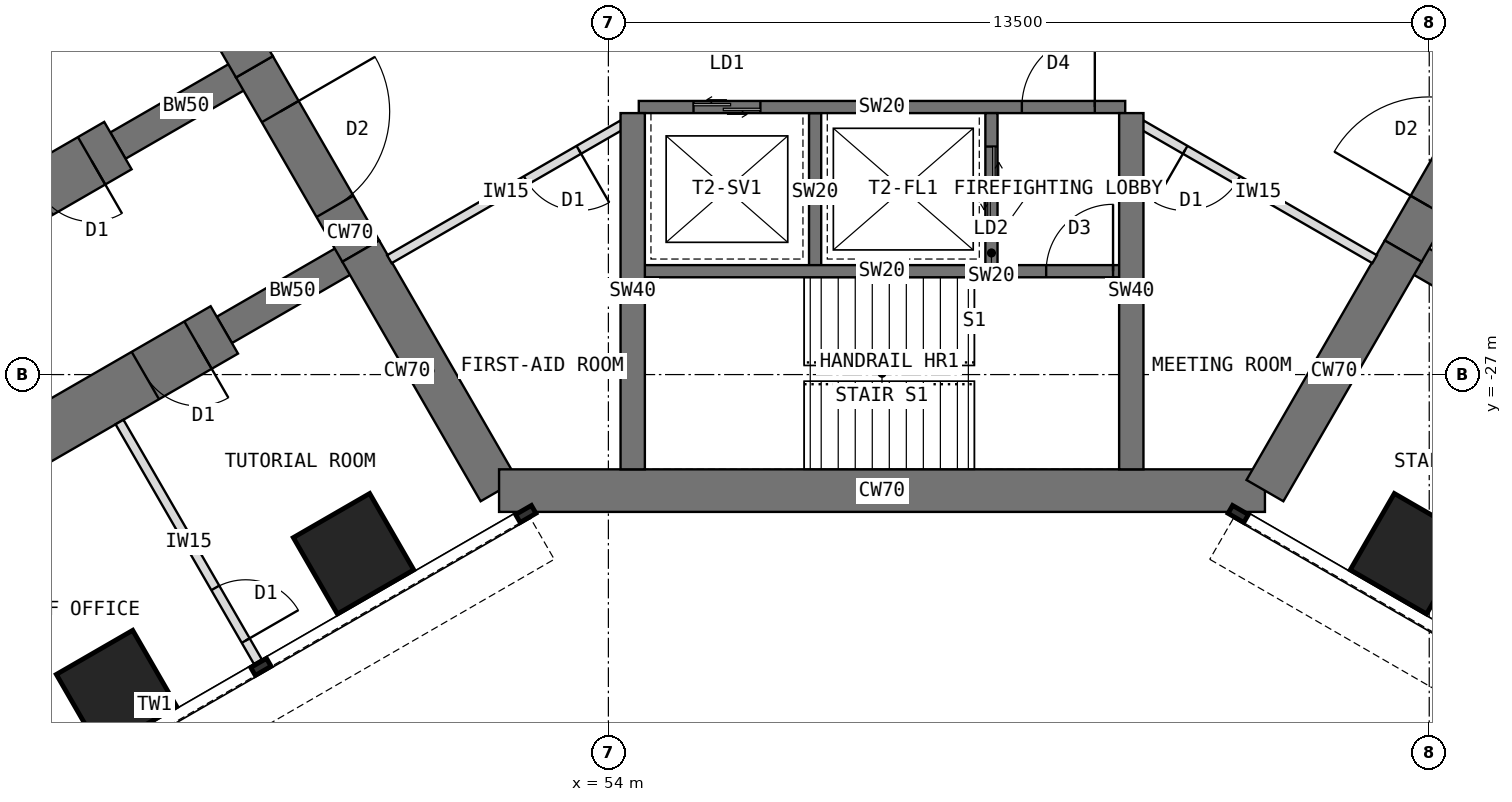
"""IFC4 building model, lengths in metres.
Left out: names, types, materials, properties, quantities, classifications, styles, units other than length and angle.
Written with IfcOpenShell. Run it as: python <this file> out.ifc"""

import sys

from ifc_helpers import new_model, si_unit, direction, frame, frame_2d, origin, origin_2d, place, context, subcontext, project, spatial, rectangle, extrude, element, fill, save


model = new_model("IFC4")
c1 = context("Model", 3, precision=1e-05, world=origin(), true_north=direction((0.0, 1.0)))
c2 = subcontext(c1, "Body", "Model", "MODEL_VIEW")
j1 = project(units=[si_unit("LENGTHUNIT", "METRE"), si_unit("PLANEANGLEUNIT", "RADIAN")], contexts=[c1])
p1 = place(None, origin())
s1 = spatial("IfcSite", under=j1, at=p1, CompositionType="ELEMENT")
p2 = place(p1, origin())
s2 = spatial("IfcBuilding", under=s1, at=p2, CompositionType="ELEMENT")
p3 = place(p2, frame((0.0, 0.0, 64.5)))
s3 = spatial("IfcBuildingStorey", under=s2, at=p3, CompositionType="ELEMENT", Elevation=64.5)
p4 = place(p3, frame((45.904, -18.0, 0.0), z_axis=(0.0, 0.0, 1.0), x_axis=(0.500024481964, -0.866011268655, 0.0)))
e1 = element("IfcWall", 1, at=p4, inside=s3, PredefinedType="SHEAR", context=c2, shape_type="SweptSolid", body=[
    extrude(rectangle(XDim=4.548, YDim=0.7, at=frame_2d((2.274, 0.0))), origin(), (0.0, 0.0, 1.0), 4.0),
])
p5 = place(p3, frame((48.178, -21.939, 0.0), z_axis=(0.0, 0.0, 1.0), x_axis=(0.500010275428, -0.866019471182, 0.0)))
e2 = element("IfcWall", 2, at=p5, inside=s3, PredefinedType="SHEAR", context=c2, shape_type="SweptSolid", body=[
    extrude(rectangle(XDim=3.5, YDim=0.7, at=frame_2d((1.75, 0.0))), origin(), (0.0, 0.0, 1.0), 4.0),
])
p6 = place(p5, frame((0.85, 0.0, 0.0)))
e3 = element("IfcOpeningElement", 3, at=p6, cuts=e2, PredefinedType="OPENING", context=c2, shape_type="SweptSolid", body=[
    extrude(rectangle(XDim=1.8, YDim=2.1, at=frame_2d((0.9, 1.05))), frame((0.0, 0.36, 0.0), z_axis=(0.0, -1.0, 0.0), x_axis=(1.0, 0.0, 0.0)), (0.0, 0.0, 1.0), 0.72),
])
p7 = place(p3, frame((49.928, -24.97, 0.0), z_axis=(0.0, 0.0, 1.0), x_axis=(0.499984222037, -0.866034513004, 0.0)))
e4 = element("IfcWall", 4, at=p7, inside=s3, PredefinedType="SHEAR", context=c2, shape_type="SweptSolid", body=[
    extrude(rectangle(XDim=4.548, YDim=0.7, at=frame_2d((2.274, 0.0))), origin(), (0.0, 0.0, 1.0), 4.0),
])
p8 = place(p3, frame((52.202, -28.908, 0.0), z_axis=(0.0, 0.0, 1.0), x_axis=(1.0, 0.0, 0.0)))
e5 = element("IfcWall", 5, at=p8, inside=s3, PredefinedType="SHEAR", context=c2, shape_type="SweptSolid", body=[
    extrude(rectangle(XDim=12.596, YDim=0.7, at=frame_2d((6.298, 0.0))), origin(), (0.0, 0.0, 1.0), 4.0),
])
p9 = place(p3, frame((64.798, -28.908, 0.0), z_axis=(0.0, 0.0, 1.0), x_axis=(0.499984222037, 0.866034513004, 0.0)))
e6 = element("IfcWall", 6, at=p9, inside=s3, PredefinedType="SHEAR", context=c2, shape_type="SweptSolid", body=[
    extrude(rectangle(XDim=4.548, YDim=0.7, at=frame_2d((2.274, 0.0))), origin(), (0.0, 0.0, 1.0), 4.0),
])
p10 = place(p3, frame((67.072, -24.97, 0.0), z_axis=(0.0, 0.0, 1.0), x_axis=(0.500010275428, 0.866019471182, 0.0)))
e7 = element("IfcWall", 7, at=p10, inside=s3, PredefinedType="SHEAR", context=c2, shape_type="SweptSolid", body=[
    extrude(rectangle(XDim=3.5, YDim=0.7, at=frame_2d((1.75, 0.0))), origin(), (0.0, 0.0, 1.0), 4.0),
])
p11 = place(p10, frame((0.85, 0.0, 0.0)))
e8 = element("IfcOpeningElement", 8, at=p11, cuts=e7, PredefinedType="OPENING", context=c2, shape_type="SweptSolid", body=[
    extrude(rectangle(XDim=1.8, YDim=2.1, at=frame_2d((0.9, 1.05))), frame((0.0, 0.36, 0.0), z_axis=(0.0, -1.0, 0.0), x_axis=(1.0, 0.0, 0.0)), (0.0, 0.0, 1.0), 0.72),
])
p12 = place(p3, frame((49.928, -24.97, 0.0), z_axis=(0.0, 0.0, 1.0), x_axis=(-0.866031863473, -0.499988811324, 0.0)))
e9 = element("IfcWall", 9, at=p12, inside=s3, PredefinedType="SHEAR", context=c2, shape_type="SweptSolid", body=[
    extrude(rectangle(XDim=2.592, YDim=0.5, at=frame_2d((1.296, 0.0))), origin(), (0.0, 0.0, 1.0), 4.0),
])
p13 = place(p3, frame((47.684, -26.266, 0.0), z_axis=(0.0, 0.0, 1.0), x_axis=(-0.866027579429, -0.499996231654, 0.0)))
e10 = element("IfcWall", 10, at=p13, inside=s3, PredefinedType="SHEAR", context=c2, shape_type="SweptSolid", body=[
    extrude(rectangle(XDim=13.2, YDim=0.9, at=frame_2d((6.6, 0.0))), origin(), (0.0, 0.0, 1.0), 4.0),
])
p14 = place(p13, frame((0.5, 0.0, 0.0)))
e11 = element("IfcOpeningElement", 11, at=p14, cuts=e10, PredefinedType="OPENING", context=c2, shape_type="SweptSolid", body=[
    extrude(rectangle(XDim=1.0, YDim=2.1, at=frame_2d((0.5, 1.05))), frame((0.0, 0.46, 0.0), z_axis=(0.0, -1.0, 0.0), x_axis=(1.0, 0.0, 0.0)), (0.0, 0.0, 1.0), 0.92),
])
p15 = place(p13, frame((7.25, 0.0, 0.0)))
e12 = element("IfcOpeningElement", 12, at=p15, cuts=e10, PredefinedType="OPENING", context=c2, shape_type="SweptSolid", body=[
    extrude(rectangle(XDim=1.0, YDim=2.1, at=frame_2d((0.5, 1.05))), frame((0.0, 0.46, 0.0), z_axis=(0.0, -1.0, 0.0), x_axis=(1.0, 0.0, 0.0)), (0.0, 0.0, 1.0), 0.92),
])
p16 = place(p3, frame((48.178, -21.939, 0.0), z_axis=(0.0, 0.0, 1.0), x_axis=(-0.866072649678, -0.499918158782, 0.0)))
e13 = element("IfcWall", 13, at=p16, inside=s3, PredefinedType="SHEAR", context=c2, shape_type="SweptSolid", body=[
    extrude(rectangle(XDim=2.592, YDim=0.5, at=frame_2d((1.296, 0.0))), origin(), (0.0, 0.0, 1.0), 4.0),
])
p17 = place(p3, frame((45.934, -23.234, 0.0), z_axis=(0.0, 0.0, 1.0), x_axis=(-0.866019570528, -0.500010103361, 0.0)))
e14 = element("IfcWall", 14, at=p17, inside=s3, PredefinedType="SHEAR", context=c2, shape_type="SweptSolid", body=[
    extrude(rectangle(XDim=13.2, YDim=0.9, at=frame_2d((6.6, 0.0))), origin(), (0.0, 0.0, 1.0), 4.0),
])
p18 = place(p17, frame((0.5, 0.0, 0.0)))
e15 = element("IfcOpeningElement", 15, at=p18, cuts=e14, PredefinedType="OPENING", context=c2, shape_type="SweptSolid", body=[
    extrude(rectangle(XDim=1.0, YDim=2.1, at=frame_2d((0.5, 1.05))), frame((0.0, 0.46, 0.0), z_axis=(0.0, -1.0, 0.0), x_axis=(1.0, 0.0, 0.0)), (0.0, 0.0, 1.0), 0.92),
])
p19 = place(p17, frame((7.25, 0.0, 0.0)))
e16 = element("IfcOpeningElement", 16, at=p19, cuts=e14, PredefinedType="OPENING", context=c2, shape_type="SweptSolid", body=[
    extrude(rectangle(XDim=1.0, YDim=2.1, at=frame_2d((0.5, 1.05))), frame((0.0, 0.46, 0.0), z_axis=(0.0, -1.0, 0.0), x_axis=(1.0, 0.0, 0.0)), (0.0, 0.0, 1.0), 0.92),
])
p20 = place(p3, frame((67.072, -24.97, 0.0), z_axis=(0.0, 0.0, 1.0), x_axis=(0.866031863473, -0.499988811324, 0.0)))
e17 = element("IfcWall", 17, at=p20, inside=s3, PredefinedType="SHEAR", context=c2, shape_type="SweptSolid", body=[
    extrude(rectangle(XDim=2.592, YDim=0.5, at=frame_2d((1.296, 0.0))), origin(), (0.0, 0.0, 1.0), 4.0),
])
for number, where, z_axis, x_axis in (
    (18, (49.809, -29.946, 0.0), (0.0, 0.0, 1.0), (0.866, 0.5, 0.0)),
    (19, (45.912, -32.196, 0.0), (0.0, 0.0, 1.0), (0.866, 0.5, 0.0)),
    (20, (67.191, -29.946, 0.0), (0.0, 0.0, 1.0), (0.5, 0.866, 0.0)),
):
    element("IfcColumn", number, at=place(p3, frame(where, z_axis=z_axis, x_axis=x_axis)), inside=s3, PredefinedType="COLUMN", context=c2, shape_type="SweptSolid", body=[
        extrude(rectangle(XDim=1.45, YDim=1.45, at=origin_2d()), origin(), (0.0, 0.0, 1.0), 4.0),
    ])
p21 = place(p3, frame((54.5, -22.6, 0.0), z_axis=(0.0, 0.0, 1.0), x_axis=(1.0, 0.0, 0.0)))
e21 = element("IfcWall", 21, at=p21, inside=s3, PredefinedType="SHEAR", context=c2, shape_type="SweptSolid", body=[
    extrude(rectangle(XDim=8.0, YDim=0.2, at=frame_2d((4.0, 0.0))), origin(), (0.0, 0.0, 1.0), 4.0),
])
p22 = place(p21, frame((6.3, 0.0, 0.0)))
e22 = element("IfcOpeningElement", 22, at=p22, cuts=e21, PredefinedType="OPENING", context=c2, shape_type="SweptSolid", body=[
    extrude(rectangle(XDim=1.2, YDim=2.1, at=frame_2d((0.6, 1.05))), frame((0.0, 0.11, 0.0), z_axis=(0.0, -1.0, 0.0), x_axis=(1.0, 0.0, 0.0)), (0.0, 0.0, 1.0), 0.22),
])
p23 = place(p21, frame((0.9, 0.0, 0.0)))
e23 = element("IfcOpeningElement", 23, at=p23, cuts=e21, PredefinedType="OPENING", context=c2, shape_type="SweptSolid", body=[
    extrude(rectangle(XDim=1.1, YDim=2.2, at=frame_2d((0.55, 1.1))), frame((0.0, 0.11, 0.0), z_axis=(0.0, -1.0, 0.0), x_axis=(1.0, 0.0, 0.0)), (0.0, 0.0, 1.0), 0.22),
])
p24 = place(p3, frame((57.4, -22.7, 0.0), z_axis=(0.0, 0.0, 1.0), x_axis=(0.0, -1.0, 0.0)))
e24 = element("IfcWall", 24, at=p24, inside=s3, PredefinedType="SHEAR", context=c2, shape_type="SweptSolid", body=[
    extrude(rectangle(XDim=2.6, YDim=0.2, at=frame_2d((1.3, 0.0))), origin(), (0.0, 0.0, 1.0), 4.0),
])
p25 = place(p3, frame((60.3, -22.7, 0.0), z_axis=(0.0, 0.0, 1.0), x_axis=(0.0, -1.0, 0.0)))
e25 = element("IfcWall", 25, at=p25, inside=s3, PredefinedType="SHEAR", context=c2, shape_type="SweptSolid", body=[
    extrude(rectangle(XDim=2.6, YDim=0.2, at=frame_2d((1.3, 0.0))), origin(), (0.0, 0.0, 1.0), 4.0),
])
p26 = place(p25, frame((0.55, 0.0, 0.0)))
e26 = element("IfcOpeningElement", 26, at=p26, cuts=e25, PredefinedType="OPENING", context=c2, shape_type="SweptSolid", body=[
    extrude(rectangle(XDim=1.3, YDim=2.2, at=frame_2d((0.65, 1.1))), frame((0.0, 0.11, 0.0), z_axis=(0.0, -1.0, 0.0), x_axis=(1.0, 0.0, 0.0)), (0.0, 0.0, 1.0), 0.22),
])
p27 = place(p3, frame((54.5, -25.3, 0.0), z_axis=(0.0, 0.0, 1.0), x_axis=(1.0, 0.0, 0.0)))
e27 = element("IfcWall", 27, at=p27, inside=s3, PredefinedType="SHEAR", context=c2, shape_type="SweptSolid", body=[
    extrude(rectangle(XDim=8.0, YDim=0.2, at=frame_2d((4.0, 0.0))), origin(), (0.0, 0.0, 1.0), 4.0),
])
p28 = place(p27, frame((6.7, 0.0, 0.0)))
e28 = element("IfcOpeningElement", 28, at=p28, cuts=e27, PredefinedType="OPENING", context=c2, shape_type="SweptSolid", body=[
    extrude(rectangle(XDim=1.1, YDim=2.1, at=frame_2d((0.55, 1.05))), frame((0.0, 0.11, 0.0), z_axis=(0.0, -1.0, 0.0), x_axis=(1.0, 0.0, 0.0)), (0.0, 0.0, 1.0), 0.22),
])
for number, where, z_axis, x_axis in (
    (29, (62.6, -22.7, 0.0), (0.0, 0.0, 1.0), (0.0, -1.0, 0.0)),
    (30, (54.4, -22.7, 0.0), (0.0, 0.0, 1.0), (0.0, -1.0, 0.0)),
):
    element("IfcWall", number, at=place(p3, frame(where, z_axis=z_axis, x_axis=x_axis)), inside=s3, PredefinedType="SHEAR", context=c2, shape_type="SweptSolid", body=[
        extrude(rectangle(XDim=5.858, YDim=0.4, at=frame_2d((2.929, 0.0))), origin(), (0.0, 0.0, 1.0), 4.0),
    ])
p29 = place(p3, frame((45.96, -27.78, 0.0), z_axis=(0.0, 0.0, 1.0), x_axis=(0.499982560684, -0.866035472144, 0.0)))
e31 = element("IfcWall", 31, at=p29, inside=s3, PredefinedType="PARTITIONING", context=c2, shape_type="SweptSolid", body=[
    extrude(rectangle(XDim=4.55, YDim=0.15, at=frame_2d((2.275, 0.0))), origin(), (0.0, 0.0, 1.0), 3.8),
])
p30 = place(p29, frame((3.15, 0.0, 0.0)))
e32 = element("IfcOpeningElement", 32, at=p30, cuts=e31, PredefinedType="OPENING", context=c2, shape_type="SweptSolid", body=[
    extrude(rectangle(XDim=1.0, YDim=2.1, at=frame_2d((0.5, 1.05))), frame((0.0, 0.085, 0.0), z_axis=(0.0, -1.0, 0.0), x_axis=(1.0, 0.0, 0.0)), (0.0, 0.0, 1.0), 0.17),
])
p31 = place(p3, frame((66.603, -25.103, 0.0), z_axis=(0.0, 0.0, 1.0), x_axis=(-0.866021148949, 0.500007369519, 0.0)))
e33 = element("IfcWall", 33, at=p31, inside=s3, PredefinedType="PARTITIONING", context=c2, shape_type="SweptSolid", body=[
    extrude(rectangle(XDim=4.426, YDim=0.15, at=frame_2d((2.213, 0.0))), origin(), (0.0, 0.0, 1.0), 3.8),
])
p32 = place(p31, frame((2.598, 0.0, 0.0)))
e34 = element("IfcOpeningElement", 34, at=p32, cuts=e33, PredefinedType="OPENING", context=c2, shape_type="SweptSolid", body=[
    extrude(rectangle(XDim=1.0, YDim=2.1, at=frame_2d((0.5, 1.05))), frame((0.0, 0.085, 0.0), z_axis=(0.0, -1.0, 0.0), x_axis=(1.0, 0.0, 0.0)), (0.0, 0.0, 1.0), 0.17),
])
p33 = place(p3, frame((54.23, -22.89, 0.0), z_axis=(0.0, 0.0, 1.0), x_axis=(-0.866021148949, -0.500007369519, 0.0)))
e35 = element("IfcWall", 35, at=p33, inside=s3, PredefinedType="PARTITIONING", context=c2, shape_type="SweptSolid", body=[
    extrude(rectangle(XDim=4.426, YDim=0.15, at=frame_2d((2.213, 0.0))), origin(), (0.0, 0.0, 1.0), 3.8),
])
p34 = place(p33, frame((0.828, 0.0, 0.0)))
e36 = element("IfcOpeningElement", 36, at=p34, cuts=e35, PredefinedType="OPENING", context=c2, shape_type="SweptSolid", body=[
    extrude(rectangle(XDim=1.0, YDim=2.1, at=frame_2d((0.5, 1.05))), frame((0.0, 0.085, 0.0), z_axis=(0.0, -1.0, 0.0), x_axis=(1.0, 0.0, 0.0)), (0.0, 0.0, 1.0), 0.17),
])
p35 = place(p22, origin())
e37 = element("IfcDoor", 37, at=p35, inside=s3, OperationType="SINGLE_SWING_RIGHT", PredefinedType="DOOR", context=c2, shape_type="SweptSolid", body=[
    extrude(rectangle(XDim=1.2, YDim=2.1, at=frame_2d((0.6, 1.05))), frame((0.0, 0.025, 0.0), z_axis=(0.0, -1.0, 0.0), x_axis=(1.0, 0.0, 0.0)), (0.0, 0.0, 1.0), 0.05),
])
fill(e22, e37)
p36 = place(p26, origin())
e38 = element("IfcDoor", 38, at=p36, inside=s3, OperationType="DOUBLE_DOOR_SLIDING", PredefinedType="DOOR", context=c2, shape_type="SweptSolid", body=[
    extrude(rectangle(XDim=1.3, YDim=2.2, at=frame_2d((0.65, 1.1))), frame((0.0, 0.025, 0.0), z_axis=(0.0, -1.0, 0.0), x_axis=(1.0, 0.0, 0.0)), (0.0, 0.0, 1.0), 0.05),
])
fill(e26, e38)
p37 = place(p23, origin())
e39 = element("IfcDoor", 39, at=p37, inside=s3, OperationType="DOUBLE_DOOR_SLIDING", PredefinedType="DOOR", context=c2, shape_type="SweptSolid", body=[
    extrude(rectangle(XDim=1.1, YDim=2.2, at=frame_2d((0.55, 1.1))), frame((0.0, 0.025, 0.0), z_axis=(0.0, -1.0, 0.0), x_axis=(1.0, 0.0, 0.0)), (0.0, 0.0, 1.0), 0.05),
])
fill(e23, e39)
p38 = place(p28, origin())
e40 = element("IfcDoor", 40, at=p38, inside=s3, OperationType="SINGLE_SWING_RIGHT", PredefinedType="DOOR", context=c2, shape_type="SweptSolid", body=[
    extrude(rectangle(XDim=1.1, YDim=2.1, at=frame_2d((0.55, 1.05))), frame((0.0, 0.025, 0.0), z_axis=(0.0, -1.0, 0.0), x_axis=(1.0, 0.0, 0.0)), (0.0, 0.0, 1.0), 0.05),
])
fill(e28, e40)
p39 = place(p6, origin())
e41 = element("IfcDoor", 41, at=p39, inside=s3, OperationType="DOUBLE_DOOR_DOUBLE_SWING", PredefinedType="DOOR", context=c2, shape_type="SweptSolid", body=[
    extrude(rectangle(XDim=1.72, YDim=2.06, at=frame_2d((0.9, 1.03))), frame((0.0, 0.025, 0.0), z_axis=(0.0, -1.0, 0.0), x_axis=(1.0, 0.0, 0.0)), (0.0, 0.0, 1.0), 0.05),
    extrude(rectangle(XDim=0.04, YDim=2.1, at=frame_2d((0.02, 1.05))), frame((0.0, 0.35, 0.0), z_axis=(0.0, -1.0, 0.0), x_axis=(1.0, 0.0, 0.0)), (0.0, 0.0, 1.0), 0.699),
    extrude(rectangle(XDim=0.04, YDim=2.1, at=frame_2d((1.78, 1.05))), frame((0.0, 0.35, 0.0), z_axis=(0.0, -1.0, 0.0), x_axis=(1.0, 0.0, 0.0)), (0.0, 0.0, 1.0), 0.699),
    extrude(rectangle(XDim=1.72, YDim=0.04, at=frame_2d((0.9, 2.08))), frame((0.0, 0.35, 0.0), z_axis=(0.0, -1.0, 0.0), x_axis=(1.0, 0.0, 0.0)), (0.0, 0.0, 1.0), 0.699),
])
fill(e3, e41)
p40 = place(p11, origin())
e42 = element("IfcDoor", 42, at=p40, inside=s3, OperationType="DOUBLE_DOOR_DOUBLE_SWING", PredefinedType="DOOR", context=c2, shape_type="SweptSolid", body=[
    extrude(rectangle(XDim=1.72, YDim=2.06, at=frame_2d((0.9, 1.03))), frame((0.0, 0.025, 0.0), z_axis=(0.0, -1.0, 0.0), x_axis=(1.0, 0.0, 0.0)), (0.0, 0.0, 1.0), 0.05),
    extrude(rectangle(XDim=0.04, YDim=2.1, at=frame_2d((0.02, 1.05))), frame((0.0, 0.35, 0.0), z_axis=(0.0, -1.0, 0.0), x_axis=(1.0, 0.0, 0.0)), (0.0, 0.0, 1.0), 0.699),
    extrude(rectangle(XDim=0.04, YDim=2.1, at=frame_2d((1.78, 1.05))), frame((0.0, 0.35, 0.0), z_axis=(0.0, -1.0, 0.0), x_axis=(1.0, 0.0, 0.0)), (0.0, 0.0, 1.0), 0.699),
    extrude(rectangle(XDim=1.72, YDim=0.04, at=frame_2d((0.9, 2.08))), frame((0.0, 0.35, 0.0), z_axis=(0.0, -1.0, 0.0), x_axis=(1.0, 0.0, 0.0)), (0.0, 0.0, 1.0), 0.699),
])
fill(e8, e42)
p41 = place(p30, origin())
e43 = element("IfcDoor", 43, at=p41, inside=s3, OperationType="SINGLE_SWING_RIGHT", PredefinedType="DOOR", context=c2, shape_type="SweptSolid", body=[
    extrude(rectangle(XDim=1.0, YDim=2.1, at=frame_2d((0.5, 1.05))), frame((0.0, 0.025, 0.0), z_axis=(0.0, -1.0, 0.0), x_axis=(1.0, 0.0, 0.0)), (0.0, 0.0, 1.0), 0.05),
])
fill(e32, e43)
p42 = place(p34, origin())
e44 = element("IfcDoor", 44, at=p42, inside=s3, OperationType="SINGLE_SWING_LEFT", PredefinedType="DOOR", context=c2, shape_type="SweptSolid", body=[
    extrude(rectangle(XDim=1.0, YDim=2.1, at=frame_2d((0.5, 1.05))), frame((0.0, 0.025, 0.0), z_axis=(0.0, -1.0, 0.0), x_axis=(1.0, 0.0, 0.0)), (0.0, 0.0, 1.0), 0.05),
])
fill(e36, e44)
p43 = place(p32, origin())
e45 = element("IfcDoor", 45, at=p43, inside=s3, OperationType="SINGLE_SWING_RIGHT", PredefinedType="DOOR", context=c2, shape_type="SweptSolid", body=[
    extrude(rectangle(XDim=1.0, YDim=2.1, at=frame_2d((0.5, 1.05))), frame((0.0, 0.025, 0.0), z_axis=(0.0, -1.0, 0.0), x_axis=(1.0, 0.0, 0.0)), (0.0, 0.0, 1.0), 0.05),
])
fill(e34, e45)
p44 = place(p14, origin())
e46 = element("IfcDoor", 46, at=p44, inside=s3, OperationType="SINGLE_SWING_LEFT", PredefinedType="DOOR", context=c2, shape_type="SweptSolid", body=[
    extrude(rectangle(XDim=0.92, YDim=2.06, at=frame_2d((0.5, 1.03))), frame((0.0, 0.025, 0.0), z_axis=(0.0, -1.0, 0.0), x_axis=(1.0, 0.0, 0.0)), (0.0, 0.0, 1.0), 0.05),
    extrude(rectangle(XDim=0.04, YDim=2.1, at=frame_2d((0.02, 1.05))), frame((0.0, 0.45, 0.0), z_axis=(0.0, -1.0, 0.0), x_axis=(1.0, 0.0, 0.0)), (0.0, 0.0, 1.0), 0.899),
    extrude(rectangle(XDim=0.04, YDim=2.1, at=frame_2d((0.98, 1.05))), frame((0.0, 0.45, 0.0), z_axis=(0.0, -1.0, 0.0), x_axis=(1.0, 0.0, 0.0)), (0.0, 0.0, 1.0), 0.899),
    extrude(rectangle(XDim=0.92, YDim=0.04, at=frame_2d((0.5, 2.08))), frame((0.0, 0.45, 0.0), z_axis=(0.0, -1.0, 0.0), x_axis=(1.0, 0.0, 0.0)), (0.0, 0.0, 1.0), 0.899),
])
fill(e11, e46)
p45 = place(p18, origin())
e47 = element("IfcDoor", 47, at=p45, inside=s3, OperationType="SINGLE_SWING_LEFT", PredefinedType="DOOR", context=c2, shape_type="SweptSolid", body=[
    extrude(rectangle(XDim=0.92, YDim=2.06, at=frame_2d((0.5, 1.03))), frame((0.0, 0.025, 0.0), z_axis=(0.0, -1.0, 0.0), x_axis=(1.0, 0.0, 0.0)), (0.0, 0.0, 1.0), 0.05),
    extrude(rectangle(XDim=0.04, YDim=2.1, at=frame_2d((0.02, 1.05))), frame((0.0, 0.45, 0.0), z_axis=(0.0, -1.0, 0.0), x_axis=(1.0, 0.0, 0.0)), (0.0, 0.0, 1.0), 0.899),
    extrude(rectangle(XDim=0.04, YDim=2.1, at=frame_2d((0.98, 1.05))), frame((0.0, 0.45, 0.0), z_axis=(0.0, -1.0, 0.0), x_axis=(1.0, 0.0, 0.0)), (0.0, 0.0, 1.0), 0.899),
    extrude(rectangle(XDim=0.92, YDim=0.04, at=frame_2d((0.5, 2.08))), frame((0.0, 0.45, 0.0), z_axis=(0.0, -1.0, 0.0), x_axis=(1.0, 0.0, 0.0)), (0.0, 0.0, 1.0), 0.899),
])
fill(e15, e47)
save(model, sys.argv[1])
